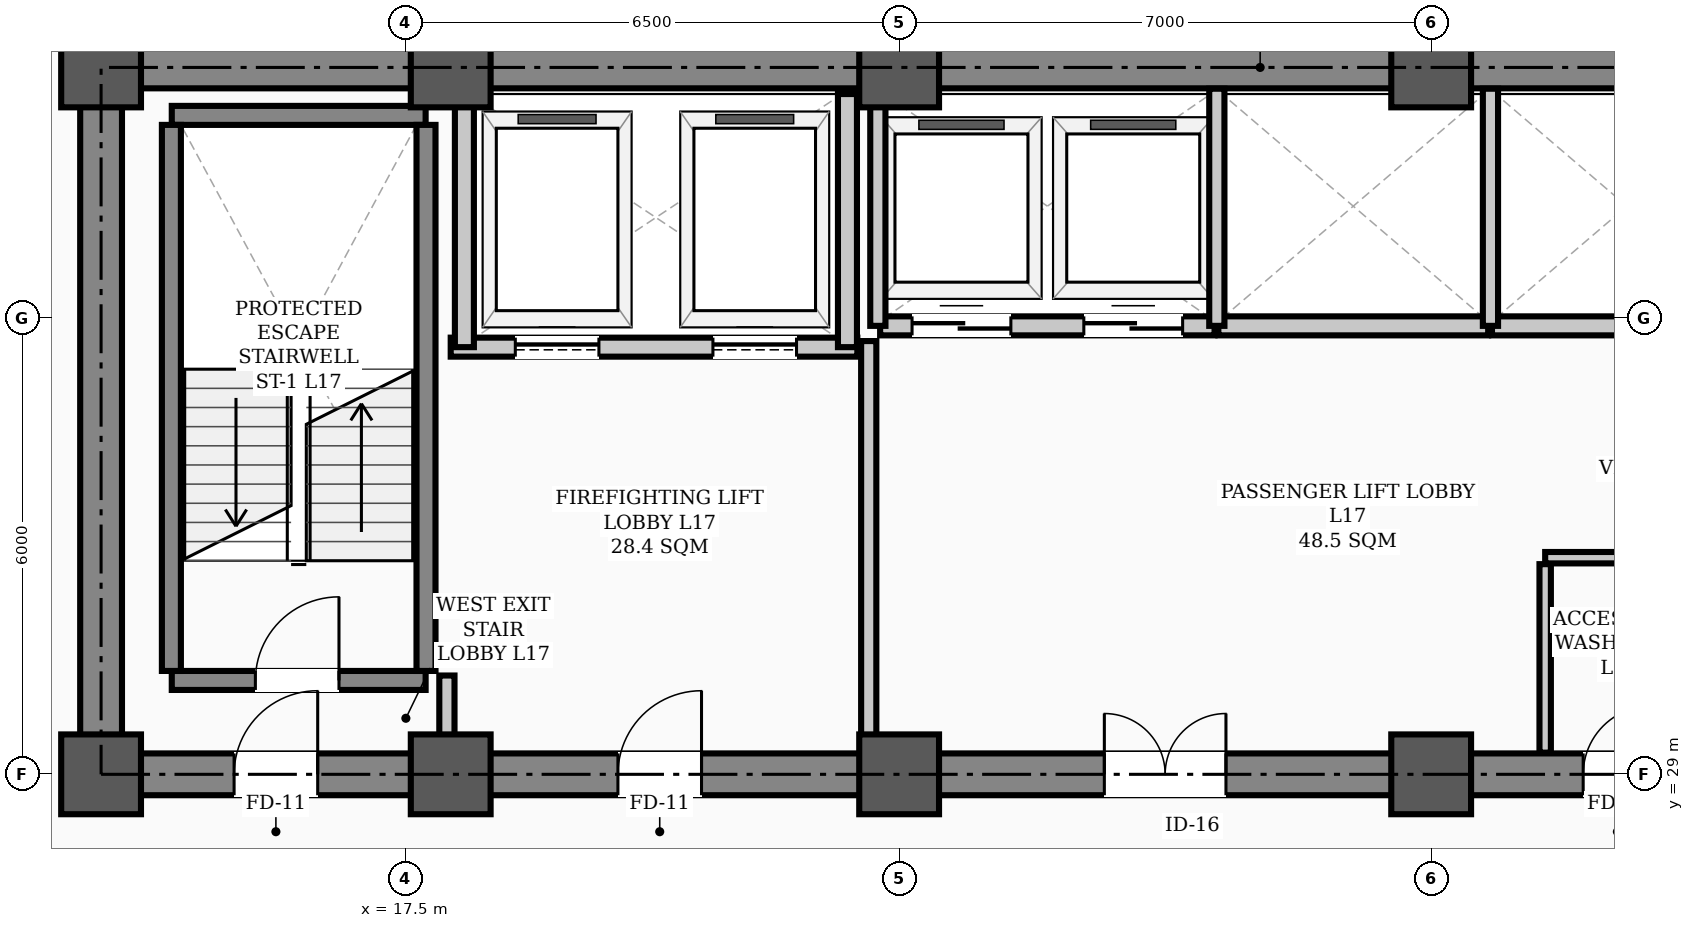
"""IFC4 building model, lengths in metres.
Left out: names, types, materials, properties, quantities, classifications, styles, units other than length and angle.
Written with IfcOpenShell. Run it as: python <this file> out.ifc"""

import sys

from ifc_helpers import new_model, si_unit, direction, frame, frame_2d, origin, origin_2d, place, context, subcontext, project, spatial, rectangle, hollow_rectangle, extrude, element, fill, save


model = new_model("IFC4")
c1 = context("Model", 3, precision=1e-05, world=origin(), true_north=direction((0.0, 1.0)))
c2 = subcontext(c1, "Body", "Model", "MODEL_VIEW")
j1 = project(units=[si_unit("LENGTHUNIT", "METRE"), si_unit("PLANEANGLEUNIT", "RADIAN")], contexts=[c1])
p1 = place(None, origin())
s1 = spatial("IfcSite", under=j1, at=p1, CompositionType="ELEMENT")
p2 = place(p1, origin())
s2 = spatial("IfcBuilding", under=s1, at=p2, CompositionType="ELEMENT")
p3 = place(p2, frame((0.0, 0.0, 69.4)))
s3 = spatial("IfcBuildingStorey", under=s2, at=p3, CompositionType="ELEMENT", Elevation=69.4)
for number, where, z_axis, x_axis in (
    (1, (13.5, 29.0, 0.0), (0.0, 0.0, 1.0), (1.0, 0.0, 0.0)),
    (2, (13.5, 38.3, 0.0), (0.0, 0.0, 1.0), (1.0, 0.0, 0.0)),
    (3, (18.1, 29.0, 0.0), (0.0, 0.0, 1.0), (1.0, 0.0, 0.0)),
    (4, (18.1, 38.3, 0.0), (0.0, 0.0, 1.0), (1.0, 0.0, 0.0)),
    (5, (24.0, 29.0, 0.0), (0.0, 0.0, 1.0), (1.0, 0.0, 0.0)),
    (6, (24.0, 38.3, 0.0), (0.0, 0.0, 1.0), (1.0, 0.0, 0.0)),
    (7, (31.0, 29.0, 0.0), (0.0, 0.0, 1.0), (1.0, 0.0, 0.0)),
    (8, (31.0, 38.3, 0.0), (0.0, 0.0, 1.0), (1.0, 0.0, 0.0)),
):
    element("IfcColumn", number, at=place(p3, frame(where, z_axis=z_axis, x_axis=x_axis)), inside=s3, PredefinedType="COLUMN", context=c2, shape_type="SweptSolid", body=[
        extrude(hollow_rectangle(XDim=1.05, YDim=1.05, WallThickness=0.038, InnerFilletRadius=0.019, OuterFilletRadius=0.057, at=origin_2d()), origin(), (0.0, 0.0, 1.0), 3.9),
    ])
p4 = place(p3, frame((13.5, 29.0, 0.0), z_axis=(0.0, 0.0, 1.0), x_axis=(1.0, 0.0, 0.0)))
e9 = element("IfcWall", 9, at=p4, inside=s3, PredefinedType="SHEAR", context=c2, shape_type="SweptSolid", body=[
    extrude(rectangle(XDim=30.5, YDim=0.55, at=frame_2d((15.25, 0.0))), origin(), (0.0, 0.0, 1.0), 3.72),
])
p5 = place(p4, frame((1.75, 0.0, 0.0)))
e10 = element("IfcOpeningElement", 10, at=p5, cuts=e9, PredefinedType="OPENING", context=c2, shape_type="SweptSolid", body=[
    extrude(rectangle(XDim=1.1, YDim=2.08, at=frame_2d((0.55, 1.04))), frame((0.0, 0.285, 0.0), z_axis=(0.0, -1.0, 0.0), x_axis=(1.0, 0.0, 0.0)), (0.0, 0.0, 1.0), 0.57),
])
p6 = place(p4, frame((26.7, 0.0, 0.0)))
e11 = element("IfcOpeningElement", 11, at=p6, cuts=e9, PredefinedType="OPENING", context=c2, shape_type="SweptSolid", body=[
    extrude(rectangle(XDim=1.1, YDim=2.08, at=frame_2d((0.55, 1.04))), frame((0.0, 0.285, 0.0), z_axis=(0.0, -1.0, 0.0), x_axis=(1.0, 0.0, 0.0)), (0.0, 0.0, 1.0), 0.57),
])
p7 = place(p4, frame((6.8, 0.0, 0.0)))
e12 = element("IfcOpeningElement", 12, at=p7, cuts=e9, PredefinedType="OPENING", context=c2, shape_type="SweptSolid", body=[
    extrude(rectangle(XDim=1.1, YDim=2.08, at=frame_2d((0.55, 1.04))), frame((0.0, 0.285, 0.0), z_axis=(0.0, -1.0, 0.0), x_axis=(1.0, 0.0, 0.0)), (0.0, 0.0, 1.0), 0.57),
])
p8 = place(p4, frame((13.2, 0.0, 0.0)))
e13 = element("IfcOpeningElement", 13, at=p8, cuts=e9, PredefinedType="OPENING", context=c2, shape_type="SweptSolid", body=[
    extrude(rectangle(XDim=1.6, YDim=2.08, at=frame_2d((0.8, 1.04))), frame((0.0, 0.285, 0.0), z_axis=(0.0, -1.0, 0.0), x_axis=(1.0, 0.0, 0.0)), (0.0, 0.0, 1.0), 0.57),
])
p9 = place(p4, frame((19.5, 0.0, 0.0)))
e14 = element("IfcOpeningElement", 14, at=p9, cuts=e9, PredefinedType="OPENING", context=c2, shape_type="SweptSolid", body=[
    extrude(rectangle(XDim=0.9, YDim=2.08, at=frame_2d((0.45, 1.04))), frame((0.0, 0.285, 0.0), z_axis=(0.0, -1.0, 0.0), x_axis=(1.0, 0.0, 0.0)), (0.0, 0.0, 1.0), 0.57),
])
p10 = place(p4, frame((21.55, 0.0, 0.0)))
e15 = element("IfcOpeningElement", 15, at=p10, cuts=e9, PredefinedType="OPENING", context=c2, shape_type="SweptSolid", body=[
    extrude(rectangle(XDim=0.9, YDim=2.08, at=frame_2d((0.45, 1.04))), frame((0.0, 0.285, 0.0), z_axis=(0.0, -1.0, 0.0), x_axis=(1.0, 0.0, 0.0)), (0.0, 0.0, 1.0), 0.57),
])
p11 = place(p3, frame((13.5, 38.3, 0.0), z_axis=(0.0, 0.0, 1.0), x_axis=(1.0, 0.0, 0.0)))
e16 = element("IfcWall", 16, at=p11, inside=s3, PredefinedType="SHEAR", context=c2, shape_type="SweptSolid", body=[
    extrude(rectangle(XDim=30.5, YDim=0.55, at=frame_2d((15.25, 0.0))), origin(), (0.0, 0.0, 1.0), 3.72),
])
p12 = place(p3, frame((13.5, 29.35, 0.0), z_axis=(0.0, 0.0, 1.0), x_axis=(0.0, 1.0, 0.0)))
e17 = element("IfcWall", 17, at=p12, inside=s3, PredefinedType="SHEAR", context=c2, shape_type="SweptSolid", body=[
    extrude(rectangle(XDim=8.6, YDim=0.55, at=frame_2d((4.3, 0.0))), origin(), (0.0, 0.0, 1.0), 3.72),
])
p13 = place(p3, frame((14.43, 30.235, 0.0), z_axis=(0.0, 0.0, 1.0), x_axis=(1.0, 0.0, 0.0)))
e18 = element("IfcWall", 18, at=p13, inside=s3, PredefinedType="STANDARD", context=c2, shape_type="SweptSolid", body=[
    extrude(rectangle(XDim=3.34, YDim=0.25, at=frame_2d((1.67, 0.0))), origin(), (0.0, 0.0, 1.0), 3.72),
])
p14 = place(p13, frame((1.1, 0.0, 0.0)))
e19 = element("IfcOpeningElement", 19, at=p14, cuts=e18, PredefinedType="OPENING", context=c2, shape_type="SweptSolid", body=[
    extrude(rectangle(XDim=1.1, YDim=2.08, at=frame_2d((0.55, 1.04))), frame((0.0, 0.135, 0.0), z_axis=(0.0, -1.0, 0.0), x_axis=(1.0, 0.0, 0.0)), (0.0, 0.0, 1.0), 0.27),
])
p15 = place(p3, frame((14.43, 37.669, 0.0), z_axis=(0.0, 0.0, 1.0), x_axis=(1.0, 0.0, 0.0)))
e20 = element("IfcWall", 20, at=p15, inside=s3, PredefinedType="STANDARD", context=c2, shape_type="SweptSolid", body=[
    extrude(rectangle(XDim=3.34, YDim=0.25, at=frame_2d((1.67, 0.0))), origin(), (0.0, 0.0, 1.0), 3.72),
])
for number, where, z_axis, x_axis in (
    (21, (14.425, 30.36, 0.0), (0.0, 0.0, 1.0), (0.0, 1.0, 0.0)),
    (22, (17.775, 30.36, 0.0), (0.0, 0.0, 1.0), (0.0, 1.0, 0.0)),
):
    element("IfcWall", number, at=place(p3, frame(where, z_axis=z_axis, x_axis=x_axis)), inside=s3, PredefinedType="STANDARD", context=c2, shape_type="SweptSolid", body=[
        extrude(rectangle(XDim=7.184, YDim=0.25, at=frame_2d((3.592, 0.0))), origin(), (0.0, 0.0, 1.0), 3.72),
    ])
p16 = place(p3, frame((18.1, 34.62, 0.0), z_axis=(0.0, 0.0, 1.0), x_axis=(1.0, 0.0, 0.0)))
e23 = element("IfcWall", 23, at=p16, inside=s3, PredefinedType="STANDARD", context=c2, shape_type="SweptSolid", body=[
    extrude(rectangle(XDim=5.35, YDim=0.25, at=frame_2d((2.675, 0.0))), origin(), (0.0, 0.0, 1.0), 3.72),
])
p17 = place(p16, frame((0.85, 0.0, 0.0)))
e24 = element("IfcOpeningElement", 24, at=p17, cuts=e23, PredefinedType="OPENING", context=c2, shape_type="SweptSolid", body=[
    extrude(rectangle(XDim=1.1, YDim=2.08, at=frame_2d((0.55, 1.04))), frame((0.0, 0.135, 0.0), z_axis=(0.0, -1.0, 0.0), x_axis=(1.0, 0.0, 0.0)), (0.0, 0.0, 1.0), 0.27),
])
p18 = place(p16, frame((3.45, 0.0, 0.0)))
e25 = element("IfcOpeningElement", 25, at=p18, cuts=e23, PredefinedType="OPENING", context=c2, shape_type="SweptSolid", body=[
    extrude(rectangle(XDim=1.1, YDim=2.08, at=frame_2d((0.55, 1.04))), frame((0.0, 0.135, 0.0), z_axis=(0.0, -1.0, 0.0), x_axis=(1.0, 0.0, 0.0)), (0.0, 0.0, 1.0), 0.27),
])
for number, where, z_axis, x_axis in (
    (26, (18.28, 34.62, 0.0), (0.0, 0.0, 1.0), (0.0, 1.0, 0.0)),
    (27, (23.32, 34.62, 0.0), (0.0, 0.0, 1.0), (0.0, 1.0, 0.0)),
):
    element("IfcWall", number, at=place(p3, frame(where, z_axis=z_axis, x_axis=x_axis)), inside=s3, PredefinedType="STANDARD", context=c2, shape_type="SweptSolid", body=[
        extrude(rectangle(XDim=3.33, YDim=0.25, at=frame_2d((1.665, 0.0))), origin(), (0.0, 0.0, 1.0), 3.3),
    ])
p19 = place(p3, frame((23.75, 34.9, 0.0), z_axis=(0.0, 0.0, 1.0), x_axis=(1.0, 0.0, 0.0)))
e28 = element("IfcWall", 28, at=p19, inside=s3, PredefinedType="STANDARD", context=c2, shape_type="SweptSolid", body=[
    extrude(rectangle(XDim=4.4, YDim=0.25, at=frame_2d((2.2, 0.0))), origin(), (0.0, 0.0, 1.0), 3.72),
])
p20 = place(p19, frame((0.42, 0.0, 0.0)))
e29 = element("IfcOpeningElement", 29, at=p20, cuts=e28, PredefinedType="OPENING", context=c2, shape_type="SweptSolid", body=[
    extrude(rectangle(XDim=1.3, YDim=2.08, at=frame_2d((0.65, 1.04))), frame((0.0, 0.135, 0.0), z_axis=(0.0, -1.0, 0.0), x_axis=(1.0, 0.0, 0.0)), (0.0, 0.0, 1.0), 0.27),
])
p21 = place(p19, frame((2.68, 0.0, 0.0)))
e30 = element("IfcOpeningElement", 30, at=p21, cuts=e28, PredefinedType="OPENING", context=c2, shape_type="SweptSolid", body=[
    extrude(rectangle(XDim=1.3, YDim=2.08, at=frame_2d((0.65, 1.04))), frame((0.0, 0.135, 0.0), z_axis=(0.0, -1.0, 0.0), x_axis=(1.0, 0.0, 0.0)), (0.0, 0.0, 1.0), 0.27),
])
p22 = place(p3, frame((28.2, 34.9, 0.0), z_axis=(0.0, 0.0, 1.0), x_axis=(1.0, 0.0, 0.0)))
e31 = element("IfcWall", 31, at=p22, inside=s3, PredefinedType="STANDARD", context=c2, shape_type="SweptSolid", body=[
    extrude(rectangle(XDim=3.55, YDim=0.25, at=frame_2d((1.775, 0.0))), origin(), (0.0, 0.0, 1.0), 3.72),
])
p23 = place(p3, frame((31.8, 34.9, 0.0), z_axis=(0.0, 0.0, 1.0), x_axis=(1.0, 0.0, 0.0)))
e32 = element("IfcWall", 32, at=p23, inside=s3, PredefinedType="STANDARD", context=c2, shape_type="SweptSolid", body=[
    extrude(rectangle(XDim=3.6, YDim=0.25, at=frame_2d((1.8, 0.0))), origin(), (0.0, 0.0, 1.0), 3.72),
])
p24 = place(p3, frame((32.5, 31.85, 0.0), z_axis=(0.0, 0.0, 1.0), x_axis=(1.0, 0.0, 0.0)))
e33 = element("IfcWall", 33, at=p24, inside=s3, PredefinedType="PARTITIONING", context=c2, shape_type="SweptSolid", body=[
    extrude(rectangle(XDim=4.1, YDim=0.15, at=frame_2d((2.05, 0.0))), origin(), (0.0, 0.0, 1.0), 3.72),
])
p25 = place(p3, frame((18.05, 29.285, 0.0), z_axis=(0.0, 0.0, 1.0), x_axis=(0.0, 1.0, 0.0)))
e34 = element("IfcWall", 34, at=p25, inside=s3, PredefinedType="STANDARD", context=c2, shape_type="SweptSolid", body=[
    extrude(rectangle(XDim=1.015, YDim=0.2, at=frame_2d((0.508, 0.0))), origin(), (0.0, 0.0, 1.0), 3.3),
])
p26 = place(p3, frame((23.6, 29.285, 0.0), z_axis=(0.0, 0.0, 1.0), x_axis=(0.0, 1.0, 0.0)))
e35 = element("IfcWall", 35, at=p26, inside=s3, PredefinedType="STANDARD", context=c2, shape_type="SweptSolid", body=[
    extrude(rectangle(XDim=5.415, YDim=0.2, at=frame_2d((2.708, 0.0))), origin(), (0.0, 0.0, 1.0), 3.1),
])
p27 = place(p3, frame((32.5, 29.285, 0.0), z_axis=(0.0, 0.0, 1.0), x_axis=(0.0, 1.0, 0.0)))
e36 = element("IfcWall", 36, at=p27, inside=s3, PredefinedType="PARTITIONING", context=c2, shape_type="SweptSolid", body=[
    extrude(rectangle(XDim=2.48, YDim=0.15, at=frame_2d((1.24, 0.0))), origin(), (0.0, 0.0, 1.0), 3.3),
])
p28 = place(p3, frame((23.72, 34.9, 0.0), z_axis=(0.0, 0.0, 1.0), x_axis=(0.0, 1.0, 0.0)))
e37 = element("IfcWall", 37, at=p28, inside=s3, PredefinedType="STANDARD", context=c2, shape_type="SweptSolid", body=[
    extrude(rectangle(XDim=3.12, YDim=0.2, at=frame_2d((1.56, 0.0))), origin(), (0.0, 0.0, 1.0), 3.1),
])
for number, where, z_axis, x_axis in (
    (38, (28.18, 34.9, 0.0), (0.0, 0.0, 1.0), (0.0, 1.0, 0.0)),
    (39, (31.78, 34.9, 0.0), (0.0, 0.0, 1.0), (0.0, 1.0, 0.0)),
):
    element("IfcWall", number, at=place(p3, frame(where, z_axis=z_axis, x_axis=x_axis)), inside=s3, PredefinedType="STANDARD", context=c2, shape_type="SweptSolid", body=[
        extrude(rectangle(XDim=3.12, YDim=0.2, at=frame_2d((1.56, 0.0))), origin(), (0.0, 0.0, 1.0), 3.3),
    ])
p29 = place(p14, origin())
e40 = element("IfcDoor", 40, at=p29, inside=s3, OperationType="SINGLE_SWING_RIGHT", PredefinedType="DOOR", context=c2, shape_type="SweptSolid", body=[
    extrude(rectangle(XDim=1.1, YDim=2.08, at=frame_2d((0.55, 1.04))), frame((0.0, 0.025, 0.0), z_axis=(0.0, -1.0, 0.0), x_axis=(1.0, 0.0, 0.0)), (0.0, 0.0, 1.0), 0.05),
])
fill(e19, e40)
p30 = place(p5, origin())
e41 = element("IfcDoor", 41, at=p30, inside=s3, OperationType="SINGLE_SWING_RIGHT", PredefinedType="DOOR", context=c2, shape_type="SweptSolid", body=[
    extrude(rectangle(XDim=1.1, YDim=2.08, at=frame_2d((0.55, 1.04))), frame((0.0, 0.025, 0.0), z_axis=(0.0, -1.0, 0.0), x_axis=(1.0, 0.0, 0.0)), (0.0, 0.0, 1.0), 0.05),
])
fill(e10, e41)
p31 = place(p7, origin())
e42 = element("IfcDoor", 42, at=p31, inside=s3, OperationType="SINGLE_SWING_RIGHT", PredefinedType="DOOR", context=c2, shape_type="SweptSolid", body=[
    extrude(rectangle(XDim=1.1, YDim=2.08, at=frame_2d((0.55, 1.04))), frame((0.0, 0.025, 0.0), z_axis=(0.0, -1.0, 0.0), x_axis=(1.0, 0.0, 0.0)), (0.0, 0.0, 1.0), 0.05),
])
fill(e12, e42)
p32 = place(p8, origin())
e43 = element("IfcDoor", 43, at=p32, inside=s3, OperationType="DOUBLE_DOOR_SINGLE_SWING", PredefinedType="DOOR", context=c2, shape_type="SweptSolid", body=[
    extrude(rectangle(XDim=1.6, YDim=2.08, at=frame_2d((0.8, 1.04))), frame((0.0, 0.025, 0.0), z_axis=(0.0, -1.0, 0.0), x_axis=(1.0, 0.0, 0.0)), (0.0, 0.0, 1.0), 0.05),
])
fill(e13, e43)
p33 = place(p9, origin())
e44 = element("IfcDoor", 44, at=p33, inside=s3, OperationType="SINGLE_SWING_RIGHT", PredefinedType="DOOR", context=c2, shape_type="SweptSolid", body=[
    extrude(rectangle(XDim=0.9, YDim=2.08, at=frame_2d((0.45, 1.04))), frame((0.0, 0.025, 0.0), z_axis=(0.0, -1.0, 0.0), x_axis=(1.0, 0.0, 0.0)), (0.0, 0.0, 1.0), 0.05),
])
fill(e14, e44)
p34 = place(p17, origin())
e45 = element("IfcDoor", 45, at=p34, inside=s3, OperationType="SLIDING_TO_LEFT", PredefinedType="DOOR", context=c2, shape_type="SweptSolid", body=[
    extrude(rectangle(XDim=1.1, YDim=2.08, at=frame_2d((0.55, 1.04))), frame((0.0, 0.025, 0.0), z_axis=(0.0, -1.0, 0.0), x_axis=(1.0, 0.0, 0.0)), (0.0, 0.0, 1.0), 0.05),
])
fill(e24, e45)
p35 = place(p18, origin())
e46 = element("IfcDoor", 46, at=p35, inside=s3, OperationType="SLIDING_TO_LEFT", PredefinedType="DOOR", context=c2, shape_type="SweptSolid", body=[
    extrude(rectangle(XDim=1.1, YDim=2.08, at=frame_2d((0.55, 1.04))), frame((0.0, 0.025, 0.0), z_axis=(0.0, -1.0, 0.0), x_axis=(1.0, 0.0, 0.0)), (0.0, 0.0, 1.0), 0.05),
])
fill(e25, e46)
p36 = place(p20, origin())
e47 = element("IfcDoor", 47, at=p36, inside=s3, OperationType="DOUBLE_DOOR_SLIDING", PredefinedType="DOOR", context=c2, shape_type="SweptSolid", body=[
    extrude(rectangle(XDim=1.3, YDim=2.08, at=frame_2d((0.65, 1.04))), frame((0.0, 0.025, 0.0), z_axis=(0.0, -1.0, 0.0), x_axis=(1.0, 0.0, 0.0)), (0.0, 0.0, 1.0), 0.05),
])
fill(e29, e47)
p37 = place(p21, origin())
e48 = element("IfcDoor", 48, at=p37, inside=s3, OperationType="DOUBLE_DOOR_SLIDING", PredefinedType="DOOR", context=c2, shape_type="SweptSolid", body=[
    extrude(rectangle(XDim=1.3, YDim=2.08, at=frame_2d((0.65, 1.04))), frame((0.0, 0.025, 0.0), z_axis=(0.0, -1.0, 0.0), x_axis=(1.0, 0.0, 0.0)), (0.0, 0.0, 1.0), 0.05),
])
fill(e30, e48)
save(model, sys.argv[1])
